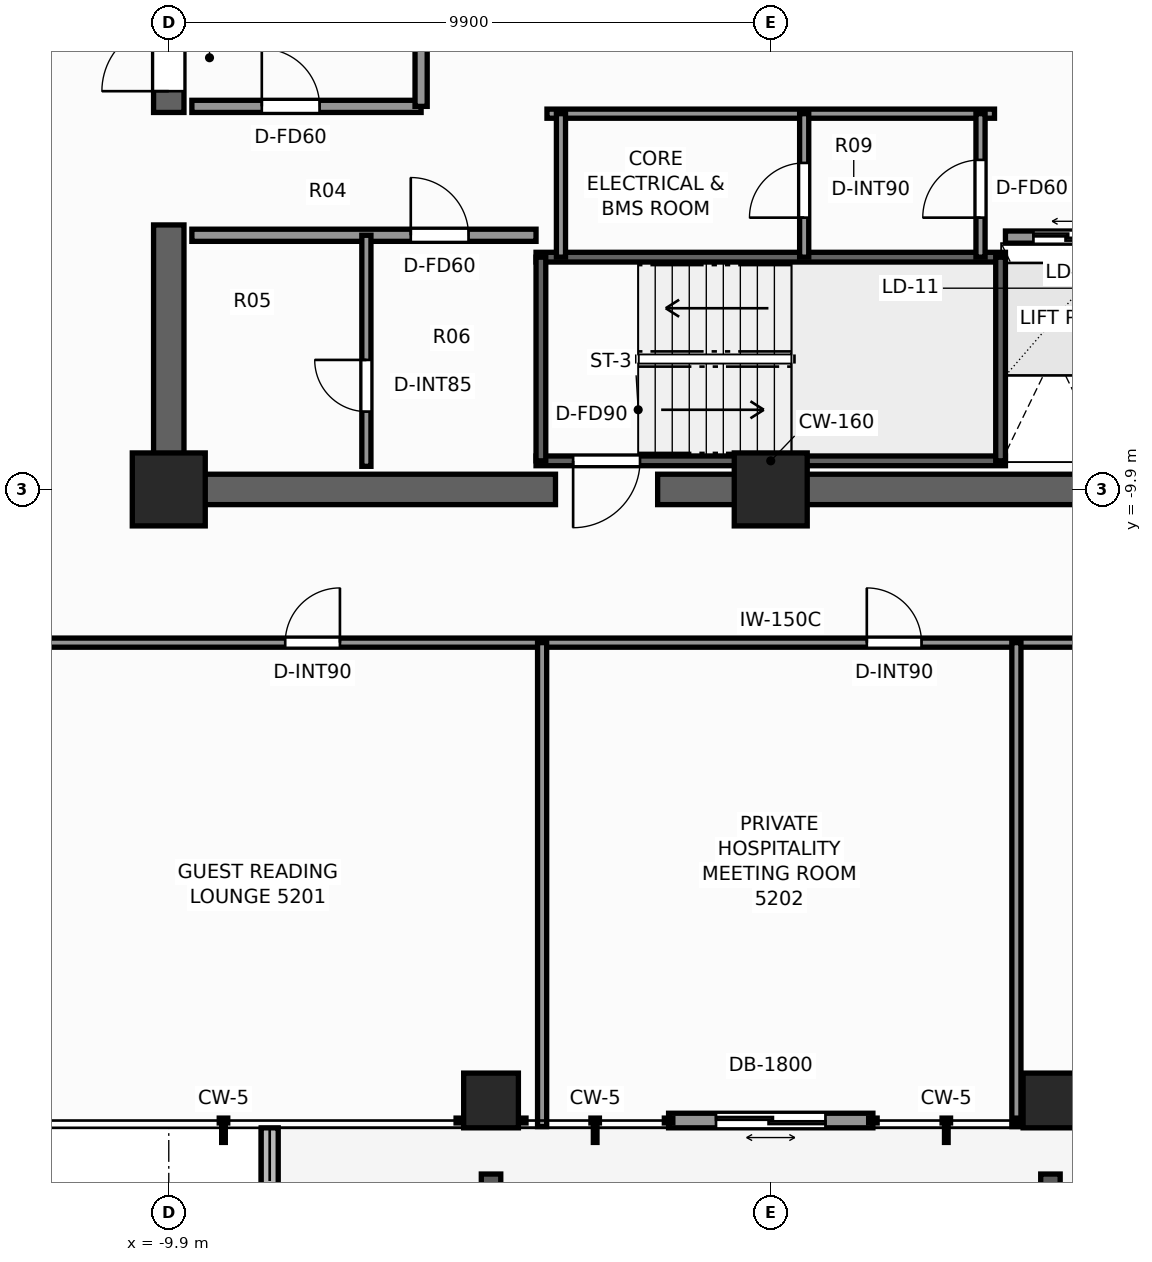
"""IFC4 building model, lengths in metres.
Left out: names, types, materials, properties, quantities, classifications, styles, units other than length and angle.
Written with IfcOpenShell. Run it as: python <this file> out.ifc"""

import sys

from ifc_helpers import new_model, si_unit, direction, frame, frame_2d, origin, origin_2d, place, context, subcontext, project, spatial, rectangle, extrude, element, fill, save


model = new_model("IFC4")
c1 = context("Model", 3, precision=1e-05, world=origin(), true_north=direction((0.0, 1.0)))
c2 = subcontext(c1, "Body", "Model", "MODEL_VIEW")
j1 = project(units=[si_unit("LENGTHUNIT", "METRE"), si_unit("PLANEANGLEUNIT", "RADIAN")], contexts=[c1])
p1 = place(None, origin())
s1 = spatial("IfcSite", under=j1, at=p1, CompositionType="ELEMENT")
p2 = place(p1, origin())
s2 = spatial("IfcBuilding", under=s1, at=p2, CompositionType="ELEMENT")
p3 = place(p2, frame((0.0, 0.0, 180.0)))
s3 = spatial("IfcBuildingStorey", under=s2, at=p3, CompositionType="ELEMENT", Elevation=180.0)
p4 = place(p3, frame((10.15, -9.9, 0.0), z_axis=(0.0, 0.0, 1.0), x_axis=(-1.0, 0.0, 0.0)))
e1 = element("IfcWall", 1, at=p4, inside=s3, PredefinedType="SHEAR", context=c2, shape_type="SweptSolid", body=[
    extrude(rectangle(XDim=12.01, YDim=0.5, at=frame_2d((6.005, 0.0))), origin(), (0.0, 0.0, 1.0), 3.3),
])
p5 = place(p3, frame((-3.54, -9.9, 0.0), z_axis=(0.0, 0.0, 1.0), x_axis=(-1.0, 0.0, 0.0)))
e2 = element("IfcWall", 2, at=p5, inside=s3, PredefinedType="SHEAR", context=c2, shape_type="SweptSolid", body=[
    extrude(rectangle(XDim=6.61, YDim=0.5, at=frame_2d((3.305, 0.0))), origin(), (0.0, 0.0, 1.0), 3.3),
])
p6 = place(p3, frame((-9.9, -9.65, 0.0), z_axis=(0.0, 0.0, 1.0), x_axis=(0.0, 1.0, 0.0)))
e3 = element("IfcWall", 3, at=p6, inside=s3, PredefinedType="SHEAR", context=c2, shape_type="SweptSolid", body=[
    extrude(rectangle(XDim=4.1, YDim=0.5, at=frame_2d((2.05, 0.0))), origin(), (0.0, 0.0, 1.0), 3.3),
])
p7 = place(p3, frame((-9.9, -3.7, 0.0), z_axis=(0.0, 0.0, 1.0), x_axis=(0.0, 1.0, 0.0)))
e4 = element("IfcWall", 4, at=p7, inside=s3, PredefinedType="SHEAR", context=c2, shape_type="SweptSolid", body=[
    extrude(rectangle(XDim=13.35, YDim=0.5, at=frame_2d((6.675, 0.0))), origin(), (0.0, 0.0, 1.0), 3.3),
])
p8 = place(p7, frame((0.35, 0.0, 0.0)))
e5 = element("IfcOpeningElement", 5, at=p8, cuts=e4, PredefinedType="OPENING", context=c2, shape_type="SweptSolid", body=[
    extrude(rectangle(XDim=1.1, YDim=2.2, at=frame_2d((0.55, 1.1))), frame((0.0, 0.26, 0.0), z_axis=(0.0, -1.0, 0.0), x_axis=(1.0, 0.0, 0.0)), (0.0, 0.0, 1.0), 0.52),
])
for number, where, z_axis, x_axis in (
    (6, (-9.9, -9.9, 0.0), (0.0, 0.0, 1.0), (1.0, 0.0, 0.0)),
    (7, (0.0, -9.9, 0.0), (0.0, 0.0, 1.0), (1.0, 0.0, 0.0)),
):
    element("IfcColumn", number, at=place(p3, frame(where, z_axis=z_axis, x_axis=x_axis)), inside=s3, PredefinedType="COLUMN", context=c2, shape_type="SweptSolid", body=[
        extrude(rectangle(XDim=1.2, YDim=1.2, at=origin_2d()), origin(), (0.0, 0.0, 1.0), 3.3),
    ])
for number, where, z_axis, x_axis in (
    (8, (-4.6, -19.95, 0.0), (0.0, 0.0, 1.0), (1.0, 0.0, 0.0)),
    (9, (4.6, -19.95, 0.0), (0.0, 0.0, 1.0), (1.0, 0.0, 0.0)),
):
    element("IfcColumn", number, at=place(p3, frame(where, z_axis=z_axis, x_axis=x_axis)), inside=s3, PredefinedType="COLUMN", context=c2, shape_type="SweptSolid", body=[
        extrude(rectangle(XDim=0.9, YDim=0.9, at=origin_2d()), origin(), (0.0, 0.0, 1.0), 3.3),
    ])
p9 = place(p3, frame((-8.24, -20.4, -0.04), z_axis=(0.0, 0.0, 1.0), x_axis=(0.0, -1.0, 0.0)))
e10 = element("IfcWall", 10, at=p9, inside=s3, PredefinedType="PARAPET", context=c2, shape_type="SweptSolid", body=[
    extrude(rectangle(XDim=1.466, YDim=0.28, at=frame_2d((0.733, 0.0))), origin(), (0.0, 0.0, 1.0), 0.42),
])
p10 = place(p3, frame((1.68, -20.28, 0.0), z_axis=(0.0, 0.0, 1.0), x_axis=(-1.0, 0.0, 0.0)))
e11 = element("IfcWall", 11, at=p10, inside=s3, PredefinedType="STANDARD", context=c2, shape_type="SweptSolid", body=[
    extrude(rectangle(XDim=3.36, YDim=0.24, at=frame_2d((1.68, 0.0))), origin(), (0.0, 0.0, 1.0), 3.08),
])
p11 = place(p10, frame((0.78, 0.0, 0.0)))
e12 = element("IfcOpeningElement", 12, at=p11, cuts=e11, PredefinedType="OPENING", context=c2, shape_type="SweptSolid", body=[
    extrude(rectangle(XDim=1.8, YDim=2.2, at=frame_2d((0.9, 1.1))), frame((0.0, 0.13, 0.0), z_axis=(0.0, -1.0, 0.0), x_axis=(1.0, 0.0, 0.0)), (0.0, 0.0, 1.0), 0.26),
])
p12 = place(p3, frame((3.86, -9.43, 0.0), z_axis=(0.0, 0.0, 1.0), x_axis=(-1.0, 0.0, 0.0)))
e13 = element("IfcWall", 13, at=p12, inside=s3, PredefinedType="SHEAR", context=c2, shape_type="SweptSolid", body=[
    extrude(rectangle(XDim=7.72, YDim=0.16, at=frame_2d((3.86, 0.0))), origin(), (0.0, 0.0, 1.0), 3.3),
])
p13 = place(p12, frame((6.01, 0.0, 0.0)))
e14 = element("IfcOpeningElement", 14, at=p13, cuts=e13, PredefinedType="OPENING", context=c2, shape_type="SweptSolid", body=[
    extrude(rectangle(XDim=1.1, YDim=2.2, at=frame_2d((0.55, 1.1))), frame((0.0, 0.09, 0.0), z_axis=(0.0, -1.0, 0.0), x_axis=(1.0, 0.0, 0.0)), (0.0, 0.0, 1.0), 0.18),
])
p14 = place(p3, frame((-3.86, -6.08, 0.0), z_axis=(0.0, 0.0, 1.0), x_axis=(1.0, 0.0, 0.0)))
e15 = element("IfcWall", 15, at=p14, inside=s3, PredefinedType="SHEAR", context=c2, shape_type="SweptSolid", body=[
    extrude(rectangle(XDim=7.72, YDim=0.16, at=frame_2d((3.86, 0.0))), origin(), (0.0, 0.0, 1.0), 3.3),
])
for number, where, z_axis, x_axis in (
    (16, (-3.78, -9.43, 0.0), (0.0, 0.0, 1.0), (0.0, 1.0, 0.0)),
    (17, (3.78, -9.43, 0.0), (0.0, 0.0, 1.0), (0.0, 1.0, 0.0)),
):
    element("IfcWall", number, at=place(p3, frame(where, z_axis=z_axis, x_axis=x_axis)), inside=s3, PredefinedType="SHEAR", context=c2, shape_type="SweptSolid", body=[
        extrude(rectangle(XDim=3.35, YDim=0.16, at=frame_2d((1.675, 0.0))), origin(), (0.0, 0.0, 1.0), 3.3),
    ])
p15 = place(p3, frame((-9.52, -3.6, 0.0), z_axis=(0.0, 0.0, 1.0), x_axis=(1.0, 0.0, 0.0)))
e18 = element("IfcWall", 18, at=p15, inside=s3, PredefinedType="SOLIDWALL", context=c2, shape_type="SweptSolid", body=[
    extrude(rectangle(XDim=3.77, YDim=0.2, at=frame_2d((1.885, 0.0))), origin(), (0.0, 0.0, 1.0), 3.08),
])
p16 = place(p15, frame((1.15, 0.0, 0.0)))
e19 = element("IfcOpeningElement", 19, at=p16, cuts=e18, PredefinedType="OPENING", context=c2, shape_type="SweptSolid", body=[
    extrude(rectangle(XDim=0.95, YDim=2.06, at=frame_2d((0.475, 1.03))), frame((0.0, 0.11, 0.0), z_axis=(0.0, -1.0, 0.0), x_axis=(1.0, 0.0, 0.0)), (0.0, 0.0, 1.0), 0.22),
])
p17 = place(p3, frame((-5.75, -3.6, 0.0), z_axis=(0.0, 0.0, 1.0), x_axis=(0.0, 1.0, 0.0)))
e20 = element("IfcWall", 20, at=p17, inside=s3, PredefinedType="SOLIDWALL", context=c2, shape_type="SweptSolid", body=[
    extrude(rectangle(XDim=5.57, YDim=0.2, at=frame_2d((2.785, 0.0))), origin(), (0.0, 0.0, 1.0), 2.715),
])
p18 = place(p17, frame((2.75, 0.0, 0.0)))
e21 = element("IfcOpeningElement", 21, at=p18, cuts=e20, PredefinedType="OPENING", context=c2, shape_type="SweptSolid", body=[
    extrude(rectangle(XDim=1.1, YDim=2.2, at=frame_2d((0.55, 1.1))), frame((0.0, 0.11, 0.0), z_axis=(0.0, -1.0, 0.0), x_axis=(1.0, 0.0, 0.0)), (0.0, 0.0, 1.0), 0.22),
])
p19 = place(p3, frame((-9.52, -5.72, 0.0), z_axis=(0.0, 0.0, 1.0), x_axis=(1.0, 0.0, 0.0)))
e22 = element("IfcWall", 22, at=p19, inside=s3, PredefinedType="SOLIDWALL", context=c2, shape_type="SweptSolid", body=[
    extrude(rectangle(XDim=5.66, YDim=0.2, at=frame_2d((2.83, 0.0))), origin(), (0.0, 0.0, 1.0), 3.08),
])
p20 = place(p19, frame((3.6, 0.0, 0.0)))
e23 = element("IfcOpeningElement", 23, at=p20, cuts=e22, PredefinedType="OPENING", context=c2, shape_type="SweptSolid", body=[
    extrude(rectangle(XDim=0.95, YDim=2.06, at=frame_2d((0.475, 1.03))), frame((0.0, 0.11, 0.0), z_axis=(0.0, -1.0, 0.0), x_axis=(1.0, 0.0, 0.0)), (0.0, 0.0, 1.0), 0.22),
])
p21 = place(p3, frame((-6.65, -9.52, 0.0), z_axis=(0.0, 0.0, 1.0), x_axis=(0.0, 1.0, 0.0)))
e24 = element("IfcWall", 24, at=p21, inside=s3, PredefinedType="PARTITIONING", context=c2, shape_type="SweptSolid", body=[
    extrude(rectangle(XDim=3.8, YDim=0.15, at=frame_2d((1.9, 0.0))), origin(), (0.0, 0.0, 1.0), 3.08),
])
p22 = place(p21, frame((0.9, 0.0, 0.0)))
e25 = element("IfcOpeningElement", 25, at=p22, cuts=e24, PredefinedType="OPENING", context=c2, shape_type="SweptSolid", body=[
    extrude(rectangle(XDim=0.85, YDim=2.03, at=frame_2d((0.425, 1.015))), frame((0.0, 0.085, 0.0), z_axis=(0.0, -1.0, 0.0), x_axis=(1.0, 0.0, 0.0)), (0.0, 0.0, 1.0), 0.17),
])
p23 = place(p3, frame((3.86, -5.75, 0.0), z_axis=(0.0, 0.0, 1.0), x_axis=(1.0, 0.0, 0.0)))
e26 = element("IfcWall", 26, at=p23, inside=s3, PredefinedType="SOLIDWALL", context=c2, shape_type="SweptSolid", body=[
    extrude(rectangle(XDim=5.66, YDim=0.2, at=frame_2d((2.83, 0.0))), origin(), (0.0, 0.0, 1.0), 3.08),
])
p24 = place(p23, frame((0.46, 0.0, 0.0)))
e27 = element("IfcOpeningElement", 27, at=p24, cuts=e26, PredefinedType="OPENING", context=c2, shape_type="SweptSolid", body=[
    extrude(rectangle(XDim=1.1, YDim=2.2, at=frame_2d((0.55, 1.1))), frame((0.0, 0.11, 0.0), z_axis=(0.0, -1.0, 0.0), x_axis=(1.0, 0.0, 0.0)), (0.0, 0.0, 1.0), 0.22),
])
p25 = place(p23, frame((2.39, 0.0, 0.0)))
e28 = element("IfcOpeningElement", 28, at=p25, cuts=e26, PredefinedType="OPENING", context=c2, shape_type="SweptSolid", body=[
    extrude(rectangle(XDim=1.1, YDim=2.2, at=frame_2d((0.55, 1.1))), frame((0.0, 0.11, 0.0), z_axis=(0.0, -1.0, 0.0), x_axis=(1.0, 0.0, 0.0)), (0.0, 0.0, 1.0), 0.22),
])
p26 = place(p23, frame((4.32, 0.0, 0.0)))
e29 = element("IfcOpeningElement", 29, at=p26, cuts=e26, PredefinedType="OPENING", context=c2, shape_type="SweptSolid", body=[
    extrude(rectangle(XDim=1.1, YDim=2.2, at=frame_2d((0.55, 1.1))), frame((0.0, 0.11, 0.0), z_axis=(0.0, -1.0, 0.0), x_axis=(1.0, 0.0, 0.0)), (0.0, 0.0, 1.0), 0.22),
])
p27 = place(p3, frame((-3.68, -3.72, 0.0), z_axis=(0.0, 0.0, 1.0), x_axis=(1.0, 0.0, 0.0)))
e30 = element("IfcWall", 30, at=p27, inside=s3, PredefinedType="PARTITIONING", context=c2, shape_type="SweptSolid", body=[
    extrude(rectangle(XDim=7.36, YDim=0.15, at=frame_2d((3.68, 0.0))), origin(), (0.0, 0.0, 1.0), 3.08),
])
p28 = place(p3, frame((3.45, -6.08, 0.0), z_axis=(0.0, 0.0, 1.0), x_axis=(0.0, 1.0, 0.0)))
e31 = element("IfcWall", 31, at=p28, inside=s3, PredefinedType="PARTITIONING", context=c2, shape_type="SweptSolid", body=[
    extrude(rectangle(XDim=2.36, YDim=0.15, at=frame_2d((1.18, 0.0))), origin(), (0.0, 0.0, 1.0), 3.08),
])
p29 = place(p28, frame((0.65, 0.0, 0.0)))
e32 = element("IfcOpeningElement", 32, at=p29, cuts=e31, PredefinedType="OPENING", context=c2, shape_type="SweptSolid", body=[
    extrude(rectangle(XDim=0.95, YDim=2.06, at=frame_2d((0.475, 1.03))), frame((0.0, 0.085, 0.0), z_axis=(0.0, -1.0, 0.0), x_axis=(1.0, 0.0, 0.0)), (0.0, 0.0, 1.0), 0.17),
])
p30 = place(p3, frame((-3.45, -6.08, 0.0), z_axis=(0.0, 0.0, 1.0), x_axis=(0.0, 1.0, 0.0)))
e33 = element("IfcWall", 33, at=p30, inside=s3, PredefinedType="PARTITIONING", context=c2, shape_type="SweptSolid", body=[
    extrude(rectangle(XDim=2.36, YDim=0.15, at=frame_2d((1.18, 0.0))), origin(), (0.0, 0.0, 1.0), 3.08),
])
p31 = place(p3, frame((0.55, -6.08, 0.0), z_axis=(0.0, 0.0, 1.0), x_axis=(0.0, 1.0, 0.0)))
e34 = element("IfcWall", 34, at=p31, inside=s3, PredefinedType="PARTITIONING", context=c2, shape_type="SweptSolid", body=[
    extrude(rectangle(XDim=2.36, YDim=0.15, at=frame_2d((1.18, 0.0))), origin(), (0.0, 0.0, 1.0), 3.08),
])
p32 = place(p31, frame((0.65, 0.0, 0.0)))
e35 = element("IfcOpeningElement", 35, at=p32, cuts=e34, PredefinedType="OPENING", context=c2, shape_type="SweptSolid", body=[
    extrude(rectangle(XDim=0.9, YDim=2.06, at=frame_2d((0.45, 1.03))), frame((0.0, 0.085, 0.0), z_axis=(0.0, -1.0, 0.0), x_axis=(1.0, 0.0, 0.0)), (0.0, 0.0, 1.0), 0.17),
])
p33 = place(p3, frame((-12.26, -12.42, 0.0), z_axis=(0.0, 0.0, 1.0), x_axis=(1.0, 0.0, 0.0)))
e36 = element("IfcWall", 36, at=p33, inside=s3, PredefinedType="PARTITIONING", context=c2, shape_type="SweptSolid", body=[
    extrude(rectangle(XDim=24.84, YDim=0.15, at=frame_2d((12.42, 0.0))), origin(), (0.0, 0.0, 1.0), 2.369),
])
p34 = place(p33, frame((4.275, 0.0, 0.0)))
e37 = element("IfcOpeningElement", 37, at=p34, cuts=e36, PredefinedType="OPENING", context=c2, shape_type="SweptSolid", body=[
    extrude(rectangle(XDim=0.9, YDim=2.06, at=frame_2d((0.45, 1.03))), frame((0.0, 0.085, 0.0), z_axis=(0.0, -1.0, 0.0), x_axis=(1.0, 0.0, 0.0)), (0.0, 0.0, 1.0), 0.17),
])
p35 = place(p33, frame((13.84, 0.0, 0.0)))
e38 = element("IfcOpeningElement", 38, at=p35, cuts=e36, PredefinedType="OPENING", context=c2, shape_type="SweptSolid", body=[
    extrude(rectangle(XDim=0.9, YDim=2.06, at=frame_2d((0.45, 1.03))), frame((0.0, 0.085, 0.0), z_axis=(0.0, -1.0, 0.0), x_axis=(1.0, 0.0, 0.0)), (0.0, 0.0, 1.0), 0.17),
])
p36 = place(p33, frame((19.345, 0.0, 0.0)))
e39 = element("IfcOpeningElement", 39, at=p36, cuts=e36, PredefinedType="OPENING", context=c2, shape_type="SweptSolid", body=[
    extrude(rectangle(XDim=0.9, YDim=2.06, at=frame_2d((0.45, 1.03))), frame((0.0, 0.085, 0.0), z_axis=(0.0, -1.0, 0.0), x_axis=(1.0, 0.0, 0.0)), (0.0, 0.0, 1.0), 0.17),
])
for number, where, z_axis, x_axis in (
    (40, (-3.76, -20.38, 0.0), (0.0, 0.0, 1.0), (0.0, 1.0, 0.0)),
    (41, (4.04, -20.38, 0.0), (0.0, 0.0, 1.0), (0.0, 1.0, 0.0)),
):
    element("IfcWall", number, at=place(p3, frame(where, z_axis=z_axis, x_axis=x_axis)), inside=s3, PredefinedType="PARTITIONING", context=c2, shape_type="SweptSolid", body=[
        extrude(rectangle(XDim=7.96, YDim=0.15, at=frame_2d((3.98, 0.0))), origin(), (0.0, 0.0, 1.0), 2.453),
    ])
p37 = place(p11, origin())
e42 = element("IfcDoor", 42, at=p37, inside=s3, OperationType="DOUBLE_DOOR_SLIDING", PredefinedType="DOOR", context=c2, shape_type="SweptSolid", body=[
    extrude(rectangle(XDim=1.8, YDim=2.2, at=frame_2d((0.9, 1.1))), frame((0.0, 0.025, 0.0), z_axis=(0.0, -1.0, 0.0), x_axis=(1.0, 0.0, 0.0)), (0.0, 0.0, 1.0), 0.05),
])
fill(e12, e42)
p38 = place(p13, origin())
e43 = element("IfcDoor", 43, at=p38, inside=s3, OperationType="SINGLE_SWING_RIGHT", PredefinedType="DOOR", context=c2, shape_type="SweptSolid", body=[
    extrude(rectangle(XDim=1.1, YDim=2.2, at=frame_2d((0.55, 1.1))), frame((0.0, 0.025, 0.0), z_axis=(0.0, -1.0, 0.0), x_axis=(1.0, 0.0, 0.0)), (0.0, 0.0, 1.0), 0.05),
])
fill(e14, e43)
p39 = place(p8, origin())
e44 = element("IfcDoor", 44, at=p39, inside=s3, OperationType="SINGLE_SWING_LEFT", PredefinedType="DOOR", context=c2, shape_type="SweptSolid", body=[
    extrude(rectangle(XDim=1.1, YDim=2.2, at=frame_2d((0.55, 1.1))), frame((0.0, 0.025, 0.0), z_axis=(0.0, -1.0, 0.0), x_axis=(1.0, 0.0, 0.0)), (0.0, 0.0, 1.0), 0.05),
])
fill(e5, e44)
p40 = place(p20, origin())
e45 = element("IfcDoor", 45, at=p40, inside=s3, OperationType="SINGLE_SWING_LEFT", PredefinedType="DOOR", context=c2, shape_type="SweptSolid", body=[
    extrude(rectangle(XDim=0.95, YDim=2.06, at=frame_2d((0.475, 1.03))), frame((0.0, 0.025, 0.0), z_axis=(0.0, -1.0, 0.0), x_axis=(1.0, 0.0, 0.0)), (0.0, 0.0, 1.0), 0.05),
])
fill(e23, e45)
p41 = place(p22, origin())
e46 = element("IfcDoor", 46, at=p41, inside=s3, OperationType="SINGLE_SWING_RIGHT", PredefinedType="DOOR", context=c2, shape_type="SweptSolid", body=[
    extrude(rectangle(XDim=0.85, YDim=2.03, at=frame_2d((0.425, 1.015))), frame((0.0, 0.025, 0.0), z_axis=(0.0, -1.0, 0.0), x_axis=(1.0, 0.0, 0.0)), (0.0, 0.0, 1.0), 0.05),
])
fill(e25, e46)
p42 = place(p16, origin())
e47 = element("IfcDoor", 47, at=p42, inside=s3, OperationType="SINGLE_SWING_LEFT", PredefinedType="DOOR", context=c2, shape_type="SweptSolid", body=[
    extrude(rectangle(XDim=0.95, YDim=2.06, at=frame_2d((0.475, 1.03))), frame((0.0, 0.025, 0.0), z_axis=(0.0, -1.0, 0.0), x_axis=(1.0, 0.0, 0.0)), (0.0, 0.0, 1.0), 0.05),
])
fill(e19, e47)
p43 = place(p24, origin())
e48 = element("IfcDoor", 48, at=p43, inside=s3, OperationType="DOUBLE_DOOR_SLIDING", PredefinedType="DOOR", context=c2, shape_type="SweptSolid", body=[
    extrude(rectangle(XDim=1.1, YDim=2.2, at=frame_2d((0.55, 1.1))), frame((0.0, 0.025, 0.0), z_axis=(0.0, -1.0, 0.0), x_axis=(1.0, 0.0, 0.0)), (0.0, 0.0, 1.0), 0.05),
])
fill(e27, e48)
p44 = place(p29, origin())
e49 = element("IfcDoor", 49, at=p44, inside=s3, OperationType="SINGLE_SWING_LEFT", PredefinedType="DOOR", context=c2, shape_type="SweptSolid", body=[
    extrude(rectangle(XDim=0.95, YDim=2.06, at=frame_2d((0.475, 1.03))), frame((0.0, 0.025, 0.0), z_axis=(0.0, -1.0, 0.0), x_axis=(1.0, 0.0, 0.0)), (0.0, 0.0, 1.0), 0.05),
])
fill(e32, e49)
p45 = place(p32, origin())
e50 = element("IfcDoor", 50, at=p45, inside=s3, OperationType="SINGLE_SWING_LEFT", PredefinedType="DOOR", context=c2, shape_type="SweptSolid", body=[
    extrude(rectangle(XDim=0.9, YDim=2.06, at=frame_2d((0.45, 1.03))), frame((0.0, 0.025, 0.0), z_axis=(0.0, -1.0, 0.0), x_axis=(1.0, 0.0, 0.0)), (0.0, 0.0, 1.0), 0.05),
])
fill(e35, e50)
p46 = place(p34, origin())
e51 = element("IfcDoor", 51, at=p46, inside=s3, OperationType="SINGLE_SWING_RIGHT", PredefinedType="DOOR", context=c2, shape_type="SweptSolid", body=[
    extrude(rectangle(XDim=0.9, YDim=2.06, at=frame_2d((0.45, 1.03))), frame((0.0, 0.025, 0.0), z_axis=(0.0, -1.0, 0.0), x_axis=(1.0, 0.0, 0.0)), (0.0, 0.0, 1.0), 0.05),
])
fill(e37, e51)
p47 = place(p35, origin())
e52 = element("IfcDoor", 52, at=p47, inside=s3, OperationType="SINGLE_SWING_LEFT", PredefinedType="DOOR", context=c2, shape_type="SweptSolid", body=[
    extrude(rectangle(XDim=0.9, YDim=2.06, at=frame_2d((0.45, 1.03))), frame((0.0, 0.025, 0.0), z_axis=(0.0, -1.0, 0.0), x_axis=(1.0, 0.0, 0.0)), (0.0, 0.0, 1.0), 0.05),
])
fill(e38, e52)
save(model, sys.argv[1])
